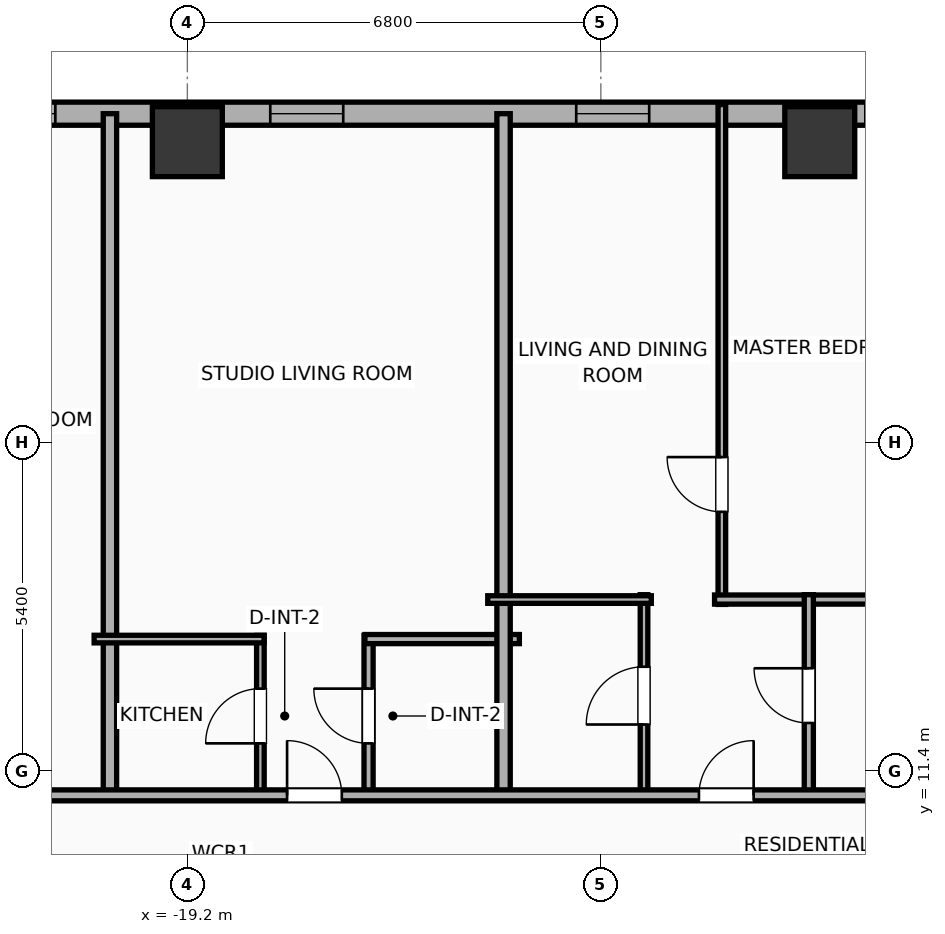
"""IFC4 building model, lengths in metres.
Left out: names, types, materials, properties, quantities, classifications, styles, units other than length and angle.
Written with IfcOpenShell. Run it as: python <this file> out.ifc"""

import sys

from ifc_helpers import new_model, si_unit, direction, frame, frame_2d, origin, origin_2d, place, context, subcontext, project, spatial, rectangle, hollow_rectangle, extrude, element, fill, save


model = new_model("IFC4")
c1 = context("Model", 3, precision=1e-05, world=origin(), true_north=direction((0.0, 1.0)))
c2 = subcontext(c1, "Body", "Model", "MODEL_VIEW")
j1 = project(units=[si_unit("LENGTHUNIT", "METRE"), si_unit("PLANEANGLEUNIT", "RADIAN")], contexts=[c1])
p1 = place(None, origin())
s1 = spatial("IfcSite", under=j1, at=p1, CompositionType="ELEMENT")
p2 = place(p1, origin())
s2 = spatial("IfcBuilding", under=s1, at=p2, CompositionType="ELEMENT")
p3 = place(p2, frame((0.0, 0.0, 65.0)))
s3 = spatial("IfcBuildingStorey", under=s2, at=p3, CompositionType="ELEMENT", Elevation=65.0)
for number, where, z_axis, x_axis in (
    (1, (-8.8, 21.75, 0.0), (0.0, 0.0, 1.0), (1.0, 0.0, 0.0)),
    (2, (-19.2, 21.75, 0.0), (0.0, 0.0, 1.0), (1.0, 0.0, 0.0)),
):
    element("IfcColumn", number, at=place(p3, frame(where, z_axis=z_axis, x_axis=x_axis)), inside=s3, PredefinedType="COLUMN", context=c2, shape_type="SweptSolid", body=[
        extrude(hollow_rectangle(XDim=1.15, YDim=1.15, WallThickness=0.04, at=origin_2d()), origin(), (0.0, 0.0, 1.0), 3.9),
    ])
p4 = place(p3, frame((-29.581, 22.21, 0.0), z_axis=(0.0, 0.0, 1.0), x_axis=(1.0, 0.0, 0.0)))
e3 = element("IfcWall", 3, at=p4, inside=s3, PredefinedType="ELEMENTEDWALL", context=c2, shape_type="SweptSolid", body=[
    extrude(rectangle(XDim=51.963, YDim=0.38, at=frame_2d((25.981, 0.0))), origin(), (0.0, 0.0, 1.0), 3.65),
])
p5 = place(p4, frame((5.81, 0.0, 0.75)))
e4 = element("IfcOpeningElement", 4, at=p5, cuts=e3, PredefinedType="OPENING", context=c2, shape_type="SweptSolid", body=[
    extrude(rectangle(XDim=2.4, YDim=2.1, at=frame_2d((1.2, 1.05))), frame((0.0, 0.2, 0.0), z_axis=(0.0, -1.0, 0.0), x_axis=(1.0, 0.0, 0.0)), (0.0, 0.0, 1.0), 0.4),
])
p6 = place(p4, frame((26.431, 0.0, 0.75)))
e5 = element("IfcOpeningElement", 5, at=p6, cuts=e3, PredefinedType="OPENING", context=c2, shape_type="SweptSolid", body=[
    extrude(rectangle(XDim=2.4, YDim=2.1, at=frame_2d((1.2, 1.05))), frame((0.0, 0.2, 0.0), z_axis=(0.0, -1.0, 0.0), x_axis=(1.0, 0.0, 0.0)), (0.0, 0.0, 1.0), 0.4),
])
p7 = place(p4, frame((43.752, 0.0, 0.75)))
e6 = element("IfcOpeningElement", 6, at=p7, cuts=e3, PredefinedType="OPENING", context=c2, shape_type="SweptSolid", body=[
    extrude(rectangle(XDim=2.4, YDim=2.1, at=frame_2d((1.2, 1.05))), frame((0.0, 0.2, 0.0), z_axis=(0.0, -1.0, 0.0), x_axis=(1.0, 0.0, 0.0)), (0.0, 0.0, 1.0), 0.4),
])
p8 = place(p4, frame((1.163, 0.0, 0.75)))
e7 = element("IfcOpeningElement", 7, at=p8, cuts=e3, PredefinedType="OPENING", context=c2, shape_type="SweptSolid", body=[
    extrude(rectangle(XDim=1.2, YDim=2.05, at=frame_2d((0.6, 1.025))), frame((0.0, 0.2, 0.0), z_axis=(0.0, -1.0, 0.0), x_axis=(1.0, 0.0, 0.0)), (0.0, 0.0, 1.0), 0.4),
])
p9 = place(p4, frame((3.251, 0.0, 0.75)))
e8 = element("IfcOpeningElement", 8, at=p9, cuts=e3, PredefinedType="OPENING", context=c2, shape_type="SweptSolid", body=[
    extrude(rectangle(XDim=1.2, YDim=2.05, at=frame_2d((0.6, 1.025))), frame((0.0, 0.2, 0.0), z_axis=(0.0, -1.0, 0.0), x_axis=(1.0, 0.0, 0.0)), (0.0, 0.0, 1.0), 0.4),
])
p10 = place(p4, frame((11.745, 0.0, 0.75)))
e9 = element("IfcOpeningElement", 9, at=p10, cuts=e3, PredefinedType="OPENING", context=c2, shape_type="SweptSolid", body=[
    extrude(rectangle(XDim=1.2, YDim=2.05, at=frame_2d((0.6, 1.025))), frame((0.0, 0.2, 0.0), z_axis=(0.0, -1.0, 0.0), x_axis=(1.0, 0.0, 0.0)), (0.0, 0.0, 1.0), 0.4),
])
p11 = place(p4, frame((16.776, 0.0, 0.75)))
e10 = element("IfcOpeningElement", 10, at=p11, cuts=e3, PredefinedType="OPENING", context=c2, shape_type="SweptSolid", body=[
    extrude(rectangle(XDim=1.2, YDim=2.05, at=frame_2d((0.6, 1.025))), frame((0.0, 0.2, 0.0), z_axis=(0.0, -1.0, 0.0), x_axis=(1.0, 0.0, 0.0)), (0.0, 0.0, 1.0), 0.4),
])
p12 = place(p4, frame((21.531, 0.0, 0.75)))
e11 = element("IfcOpeningElement", 11, at=p12, cuts=e3, PredefinedType="OPENING", context=c2, shape_type="SweptSolid", body=[
    extrude(rectangle(XDim=0.85, YDim=2.05, at=frame_2d((0.425, 1.025))), frame((0.0, 0.2, 0.0), z_axis=(0.0, -1.0, 0.0), x_axis=(1.0, 0.0, 0.0)), (0.0, 0.0, 1.0), 0.4),
])
p13 = place(p4, frame((23.776, 0.0, 0.75)))
e12 = element("IfcOpeningElement", 12, at=p13, cuts=e3, PredefinedType="OPENING", context=c2, shape_type="SweptSolid", body=[
    extrude(rectangle(XDim=1.2, YDim=2.05, at=frame_2d((0.6, 1.025))), frame((0.0, 0.2, 0.0), z_axis=(0.0, -1.0, 0.0), x_axis=(1.0, 0.0, 0.0)), (0.0, 0.0, 1.0), 0.4),
])
p14 = place(p4, frame((32.031, 0.0, 0.75)))
e13 = element("IfcOpeningElement", 13, at=p14, cuts=e3, PredefinedType="OPENING", context=c2, shape_type="SweptSolid", body=[
    extrude(rectangle(XDim=0.85, YDim=2.05, at=frame_2d((0.425, 1.025))), frame((0.0, 0.2, 0.0), z_axis=(0.0, -1.0, 0.0), x_axis=(1.0, 0.0, 0.0)), (0.0, 0.0, 1.0), 0.4),
])
p15 = place(p4, frame((34.276, 0.0, 0.75)))
e14 = element("IfcOpeningElement", 14, at=p15, cuts=e3, PredefinedType="OPENING", context=c2, shape_type="SweptSolid", body=[
    extrude(rectangle(XDim=1.2, YDim=2.05, at=frame_2d((0.6, 1.025))), frame((0.0, 0.2, 0.0), z_axis=(0.0, -1.0, 0.0), x_axis=(1.0, 0.0, 0.0)), (0.0, 0.0, 1.0), 0.4),
])
p16 = place(p4, frame((37.776, 0.0, 0.75)))
e15 = element("IfcOpeningElement", 15, at=p16, cuts=e3, PredefinedType="OPENING", context=c2, shape_type="SweptSolid", body=[
    extrude(rectangle(XDim=1.2, YDim=2.05, at=frame_2d((0.6, 1.025))), frame((0.0, 0.2, 0.0), z_axis=(0.0, -1.0, 0.0), x_axis=(1.0, 0.0, 0.0)), (0.0, 0.0, 1.0), 0.4),
])
p17 = place(p4, frame((42.411, 0.0, 0.75)))
e16 = element("IfcOpeningElement", 16, at=p17, cuts=e3, PredefinedType="OPENING", context=c2, shape_type="SweptSolid", body=[
    extrude(rectangle(XDim=0.85, YDim=2.05, at=frame_2d((0.425, 1.025))), frame((0.0, 0.2, 0.0), z_axis=(0.0, -1.0, 0.0), x_axis=(1.0, 0.0, 0.0)), (0.0, 0.0, 1.0), 0.4),
])
p18 = place(p4, frame((47.791, 0.0, 0.75)))
e17 = element("IfcOpeningElement", 17, at=p18, cuts=e3, PredefinedType="OPENING", context=c2, shape_type="SweptSolid", body=[
    extrude(rectangle(XDim=1.2, YDim=2.05, at=frame_2d((0.6, 1.025))), frame((0.0, 0.2, 0.0), z_axis=(0.0, -1.0, 0.0), x_axis=(1.0, 0.0, 0.0)), (0.0, 0.0, 1.0), 0.4),
])
p19 = place(p4, frame((49.901, 0.0, 0.75)))
e18 = element("IfcOpeningElement", 18, at=p19, cuts=e3, PredefinedType="OPENING", context=c2, shape_type="SweptSolid", body=[
    extrude(rectangle(XDim=1.2, YDim=2.05, at=frame_2d((0.6, 1.025))), frame((0.0, 0.2, 0.0), z_axis=(0.0, -1.0, 0.0), x_axis=(1.0, 0.0, 0.0)), (0.0, 0.0, 1.0), 0.4),
])
p20 = place(p3, frame((-20.473, 10.92, 0.0), z_axis=(0.0, 0.0, 1.0), x_axis=(0.0, 1.0, 0.0)))
e19 = element("IfcWall", 19, at=p20, inside=s3, PredefinedType="PARTITIONING", context=c2, shape_type="SweptSolid", body=[
    extrude(rectangle(XDim=11.29, YDim=0.22, at=frame_2d((5.645, 0.0))), origin(), (0.0, 0.0, 1.0), 3.65),
])
p21 = place(p3, frame((-17.999, 10.98, 0.0), z_axis=(0.0, 0.0, 1.0), x_axis=(0.0, 1.0, 0.0)))
e20 = element("IfcWall", 20, at=p21, inside=s3, PredefinedType="PARTITIONING", context=c2, shape_type="SweptSolid", body=[
    extrude(rectangle(XDim=2.65, YDim=0.125, at=frame_2d((1.325, 0.0))), origin(), (0.0, 0.0, 1.0), 3.65),
])
p22 = place(p21, frame((0.875, 0.0, 0.0)))
e21 = element("IfcOpeningElement", 21, at=p22, cuts=e20, PredefinedType="OPENING", context=c2, shape_type="SweptSolid", body=[
    extrude(rectangle(XDim=0.9, YDim=2.05, at=frame_2d((0.45, 1.025))), frame((0.0, 0.073, 0.0), z_axis=(0.0, -1.0, 0.0), x_axis=(1.0, 0.0, 0.0)), (0.0, 0.0, 1.0), 0.145),
])
p23 = place(p3, frame((-16.22, 10.98, 0.0), z_axis=(0.0, 0.0, 1.0), x_axis=(0.0, 1.0, 0.0)))
e22 = element("IfcWall", 22, at=p23, inside=s3, PredefinedType="PLUMBINGWALL", context=c2, shape_type="SweptSolid", body=[
    extrude(rectangle(XDim=2.65, YDim=0.15, at=frame_2d((1.325, 0.0))), origin(), (0.0, 0.0, 1.0), 3.65),
])
p24 = place(p23, frame((0.875, 0.0, 0.0)))
e23 = element("IfcOpeningElement", 23, at=p24, cuts=e22, PredefinedType="OPENING", context=c2, shape_type="SweptSolid", body=[
    extrude(rectangle(XDim=0.9, YDim=2.05, at=frame_2d((0.45, 1.025))), frame((0.0, 0.085, 0.0), z_axis=(0.0, -1.0, 0.0), x_axis=(1.0, 0.0, 0.0)), (0.0, 0.0, 1.0), 0.17),
])
p25 = place(p3, frame((-20.733, 13.57, 0.0), z_axis=(0.0, 0.0, 1.0), x_axis=(1.0, 0.0, 0.0)))
e24 = element("IfcWall", 24, at=p25, inside=s3, PredefinedType="PARTITIONING", context=c2, shape_type="SweptSolid", body=[
    extrude(rectangle(XDim=2.794, YDim=0.125, at=frame_2d((1.397, 0.0))), origin(), (0.0, 0.0, 1.0), 3.65),
])
p26 = place(p3, frame((-16.28, 13.57, 0.0), z_axis=(0.0, 0.0, 1.0), x_axis=(1.0, 0.0, 0.0)))
e25 = element("IfcWall", 25, at=p26, inside=s3, PredefinedType="PLUMBINGWALL", context=c2, shape_type="SweptSolid", body=[
    extrude(rectangle(XDim=2.54, YDim=0.15, at=frame_2d((1.27, 0.0))), origin(), (0.0, 0.0, 1.0), 3.65),
])
p27 = place(p3, frame((-14.0, 10.92, 0.0), z_axis=(0.0, 0.0, 1.0), x_axis=(0.0, 1.0, 0.0)))
e26 = element("IfcWall", 26, at=p27, inside=s3, PredefinedType="PARTITIONING", context=c2, shape_type="SweptSolid", body=[
    extrude(rectangle(XDim=11.29, YDim=0.22, at=frame_2d((5.645, 0.0))), origin(), (0.0, 0.0, 1.0), 3.65),
])
p28 = place(p3, frame((-10.41, 14.14, 0.0), z_axis=(0.0, 0.0, 1.0), x_axis=(0.0, 1.0, 0.0)))
e27 = element("IfcWall", 27, at=p28, inside=s3, PredefinedType="PARTITIONING", context=c2, shape_type="SweptSolid", body=[
    extrude(rectangle(XDim=8.22, YDim=0.125, at=frame_2d((4.11, 0.0))), origin(), (0.0, 0.0, 1.0), 2.94),
])
p29 = place(p28, frame((1.523, 0.0, 0.0)))
e28 = element("IfcOpeningElement", 28, at=p29, cuts=e27, PredefinedType="OPENING", context=c2, shape_type="SweptSolid", body=[
    extrude(rectangle(XDim=0.9, YDim=2.05, at=frame_2d((0.45, 1.025))), frame((0.0, 0.073, 0.0), z_axis=(0.0, -1.0, 0.0), x_axis=(1.0, 0.0, 0.0)), (0.0, 0.0, 1.0), 0.145),
])
p30 = place(p3, frame((-10.53, 14.22, 0.0), z_axis=(0.0, 0.0, 1.0), x_axis=(1.0, 0.0, 0.0)))
e29 = element("IfcWall", 29, at=p30, inside=s3, PredefinedType="PLUMBINGWALL", context=c2, shape_type="SweptSolid", body=[
    extrude(rectangle(XDim=3.605, YDim=0.15, at=frame_2d((1.802, 0.0))), origin(), (0.0, 0.0, 1.0), 3.65),
])
p31 = place(p3, frame((-11.69, 10.98, 0.0), z_axis=(0.0, 0.0, 1.0), x_axis=(0.0, 1.0, 0.0)))
e30 = element("IfcWall", 30, at=p31, inside=s3, PredefinedType="PARTITIONING", context=c2, shape_type="SweptSolid", body=[
    extrude(rectangle(XDim=3.32, YDim=0.125, at=frame_2d((1.66, 0.0))), origin(), (0.0, 0.0, 1.0), 3.65),
])
p32 = place(p31, frame((1.185, 0.0, 0.0)))
e31 = element("IfcOpeningElement", 31, at=p32, cuts=e30, PredefinedType="OPENING", context=c2, shape_type="SweptSolid", body=[
    extrude(rectangle(XDim=0.95, YDim=2.05, at=frame_2d((0.475, 1.025))), frame((0.0, 0.073, 0.0), z_axis=(0.0, -1.0, 0.0), x_axis=(1.0, 0.0, 0.0)), (0.0, 0.0, 1.0), 0.145),
])
p33 = place(p3, frame((-14.26, 14.22, 0.0), z_axis=(0.0, 0.0, 1.0), x_axis=(1.0, 0.0, 0.0)))
e32 = element("IfcWall", 32, at=p33, inside=s3, PredefinedType="PARTITIONING", context=c2, shape_type="SweptSolid", body=[
    extrude(rectangle(XDim=2.69, YDim=0.125, at=frame_2d((1.345, 0.0))), origin(), (0.0, 0.0, 1.0), 3.65),
])
p34 = place(p3, frame((-8.98, 10.98, 0.0), z_axis=(0.0, 0.0, 1.0), x_axis=(0.0, 1.0, 0.0)))
e33 = element("IfcWall", 33, at=p34, inside=s3, PredefinedType="PLUMBINGWALL", context=c2, shape_type="SweptSolid", body=[
    extrude(rectangle(XDim=3.32, YDim=0.15, at=frame_2d((1.66, 0.0))), origin(), (0.0, 0.0, 1.0), 3.65),
])
p35 = place(p34, frame((1.21, 0.0, 0.0)))
e34 = element("IfcOpeningElement", 34, at=p35, cuts=e33, PredefinedType="OPENING", context=c2, shape_type="SweptSolid", body=[
    extrude(rectangle(XDim=0.9, YDim=2.05, at=frame_2d((0.45, 1.025))), frame((0.0, 0.085, 0.0), z_axis=(0.0, -1.0, 0.0), x_axis=(1.0, 0.0, 0.0)), (0.0, 0.0, 1.0), 0.17),
])
p36 = place(p3, frame((-33.41, 11.0, 0.0), z_axis=(0.0, 0.0, 1.0), x_axis=(1.0, 0.0, 0.0)))
e35 = element("IfcWall", 35, at=p36, inside=s3, PredefinedType="PARTITIONING", context=c2, shape_type="SweptSolid", body=[
    extrude(rectangle(XDim=59.62, YDim=0.18, at=frame_2d((29.81, 0.0))), origin(), (0.0, 0.0, 1.0), 3.65),
])
p37 = place(p36, frame((2.913, 0.0, 0.0)))
e36 = element("IfcOpeningElement", 36, at=p37, cuts=e35, PredefinedType="OPENING", context=c2, shape_type="SweptSolid", body=[
    extrude(rectangle(XDim=0.9, YDim=2.05, at=frame_2d((0.45, 1.025))), frame((0.0, 0.1, 0.0), z_axis=(0.0, -1.0, 0.0), x_axis=(1.0, 0.0, 0.0)), (0.0, 0.0, 1.0), 0.2),
])
p38 = place(p36, frame((10.312, 0.0, 0.0)))
e37 = element("IfcOpeningElement", 37, at=p38, cuts=e35, PredefinedType="OPENING", context=c2, shape_type="SweptSolid", body=[
    extrude(rectangle(XDim=1.15, YDim=2.05, at=frame_2d((0.575, 1.025))), frame((0.0, 0.1, 0.0), z_axis=(0.0, -1.0, 0.0), x_axis=(1.0, 0.0, 0.0)), (0.0, 0.0, 1.0), 0.2),
])
p39 = place(p36, frame((15.85, 0.0, 0.0)))
e38 = element("IfcOpeningElement", 38, at=p39, cuts=e35, PredefinedType="OPENING", context=c2, shape_type="SweptSolid", body=[
    extrude(rectangle(XDim=0.9, YDim=2.05, at=frame_2d((0.45, 1.025))), frame((0.0, 0.1, 0.0), z_axis=(0.0, -1.0, 0.0), x_axis=(1.0, 0.0, 0.0)), (0.0, 0.0, 1.0), 0.2),
])
p40 = place(p36, frame((22.623, 0.0, 0.0)))
e39 = element("IfcOpeningElement", 39, at=p40, cuts=e35, PredefinedType="OPENING", context=c2, shape_type="SweptSolid", body=[
    extrude(rectangle(XDim=0.9, YDim=2.05, at=frame_2d((0.45, 1.025))), frame((0.0, 0.1, 0.0), z_axis=(0.0, -1.0, 0.0), x_axis=(1.0, 0.0, 0.0)), (0.0, 0.0, 1.0), 0.2),
])
p41 = place(p36, frame((29.622, 0.0, 0.0)))
e40 = element("IfcOpeningElement", 40, at=p41, cuts=e35, PredefinedType="OPENING", context=c2, shape_type="SweptSolid", body=[
    extrude(rectangle(XDim=0.9, YDim=2.05, at=frame_2d((0.45, 1.025))), frame((0.0, 0.1, 0.0), z_axis=(0.0, -1.0, 0.0), x_axis=(1.0, 0.0, 0.0)), (0.0, 0.0, 1.0), 0.2),
])
p42 = place(p36, frame((36.628, 0.0, 0.0)))
e41 = element("IfcOpeningElement", 41, at=p42, cuts=e35, PredefinedType="OPENING", context=c2, shape_type="SweptSolid", body=[
    extrude(rectangle(XDim=0.9, YDim=2.05, at=frame_2d((0.45, 1.025))), frame((0.0, 0.1, 0.0), z_axis=(0.0, -1.0, 0.0), x_axis=(1.0, 0.0, 0.0)), (0.0, 0.0, 1.0), 0.2),
])
p43 = place(p36, frame((43.627, 0.0, 0.0)))
e42 = element("IfcOpeningElement", 42, at=p43, cuts=e35, PredefinedType="OPENING", context=c2, shape_type="SweptSolid", body=[
    extrude(rectangle(XDim=0.9, YDim=2.05, at=frame_2d((0.45, 1.025))), frame((0.0, 0.1, 0.0), z_axis=(0.0, -1.0, 0.0), x_axis=(1.0, 0.0, 0.0)), (0.0, 0.0, 1.0), 0.2),
])
p44 = place(p36, frame((48.617, 0.0, 0.0)))
e43 = element("IfcOpeningElement", 43, at=p44, cuts=e35, PredefinedType="OPENING", context=c2, shape_type="SweptSolid", body=[
    extrude(rectangle(XDim=1.15, YDim=2.05, at=frame_2d((0.575, 1.025))), frame((0.0, 0.1, 0.0), z_axis=(0.0, -1.0, 0.0), x_axis=(1.0, 0.0, 0.0)), (0.0, 0.0, 1.0), 0.2),
])
p45 = place(p36, frame((56.272, 0.0, 0.0)))
e44 = element("IfcOpeningElement", 44, at=p45, cuts=e35, PredefinedType="OPENING", context=c2, shape_type="SweptSolid", body=[
    extrude(rectangle(XDim=0.9, YDim=2.05, at=frame_2d((0.45, 1.025))), frame((0.0, 0.1, 0.0), z_axis=(0.0, -1.0, 0.0), x_axis=(1.0, 0.0, 0.0)), (0.0, 0.0, 1.0), 0.2),
])
p46 = place(p5, origin())
e45 = element("IfcWindow", 45, at=p46, inside=s3, PartitioningType="SINGLE_PANEL", PredefinedType="WINDOW", context=c2, shape_type="SweptSolid", body=[
    extrude(rectangle(XDim=2.4, YDim=2.1, at=frame_2d((1.2, 1.05))), frame((0.0, 0.03, 0.0), z_axis=(0.0, -1.0, 0.0), x_axis=(1.0, 0.0, 0.0)), (0.0, 0.0, 1.0), 0.06),
])
fill(e4, e45)
p47 = place(p10, origin())
e46 = element("IfcWindow", 46, at=p47, inside=s3, PartitioningType="SINGLE_PANEL", PredefinedType="WINDOW", context=c2, shape_type="SweptSolid", body=[
    extrude(rectangle(XDim=1.2, YDim=2.05, at=frame_2d((0.6, 1.025))), frame((0.0, 0.03, 0.0), z_axis=(0.0, -1.0, 0.0), x_axis=(1.0, 0.0, 0.0)), (0.0, 0.0, 1.0), 0.06),
])
fill(e9, e46)
p48 = place(p11, origin())
e47 = element("IfcWindow", 47, at=p48, inside=s3, PartitioningType="SINGLE_PANEL", PredefinedType="WINDOW", context=c2, shape_type="SweptSolid", body=[
    extrude(rectangle(XDim=1.2, YDim=2.05, at=frame_2d((0.6, 1.025))), frame((0.0, 0.03, 0.0), z_axis=(0.0, -1.0, 0.0), x_axis=(1.0, 0.0, 0.0)), (0.0, 0.0, 1.0), 0.06),
])
fill(e10, e47)
p49 = place(p12, origin())
e48 = element("IfcWindow", 48, at=p49, inside=s3, PartitioningType="SINGLE_PANEL", PredefinedType="WINDOW", context=c2, shape_type="SweptSolid", body=[
    extrude(rectangle(XDim=0.85, YDim=2.05, at=frame_2d((0.425, 1.025))), frame((0.0, 0.03, 0.0), z_axis=(0.0, -1.0, 0.0), x_axis=(1.0, 0.0, 0.0)), (0.0, 0.0, 1.0), 0.06),
])
fill(e11, e48)
p50 = place(p22, origin())
e49 = element("IfcDoor", 49, at=p50, inside=s3, OperationType="SINGLE_SWING_LEFT", PredefinedType="DOOR", context=c2, shape_type="SweptSolid", body=[
    extrude(rectangle(XDim=0.9, YDim=2.05, at=frame_2d((0.45, 1.025))), frame((0.0, 0.025, 0.0), z_axis=(0.0, -1.0, 0.0), x_axis=(1.0, 0.0, 0.0)), (0.0, 0.0, 1.0), 0.05),
])
fill(e21, e49)
p51 = place(p24, origin())
e50 = element("IfcDoor", 50, at=p51, inside=s3, OperationType="SINGLE_SWING_RIGHT", PredefinedType="DOOR", context=c2, shape_type="SweptSolid", body=[
    extrude(rectangle(XDim=0.9, YDim=2.05, at=frame_2d((0.45, 1.025))), frame((0.0, 0.025, 0.0), z_axis=(0.0, -1.0, 0.0), x_axis=(1.0, 0.0, 0.0)), (0.0, 0.0, 1.0), 0.05),
])
fill(e23, e50)
p52 = place(p29, origin())
e51 = element("IfcDoor", 51, at=p52, inside=s3, OperationType="SINGLE_SWING_RIGHT", PredefinedType="DOOR", context=c2, shape_type="SweptSolid", body=[
    extrude(rectangle(XDim=0.9, YDim=2.05, at=frame_2d((0.45, 1.025))), frame((0.0, 0.025, 0.0), z_axis=(0.0, -1.0, 0.0), x_axis=(1.0, 0.0, 0.0)), (0.0, 0.0, 1.0), 0.05),
])
fill(e28, e51)
p53 = place(p32, origin())
e52 = element("IfcDoor", 52, at=p53, inside=s3, OperationType="SINGLE_SWING_LEFT", PredefinedType="DOOR", context=c2, shape_type="SweptSolid", body=[
    extrude(rectangle(XDim=0.95, YDim=2.05, at=frame_2d((0.475, 1.025))), frame((0.0, 0.025, 0.0), z_axis=(0.0, -1.0, 0.0), x_axis=(1.0, 0.0, 0.0)), (0.0, 0.0, 1.0), 0.05),
])
fill(e31, e52)
p54 = place(p35, origin())
e53 = element("IfcDoor", 53, at=p54, inside=s3, OperationType="SINGLE_SWING_RIGHT", PredefinedType="DOOR", context=c2, shape_type="SweptSolid", body=[
    extrude(rectangle(XDim=0.9, YDim=2.05, at=frame_2d((0.45, 1.025))), frame((0.0, 0.025, 0.0), z_axis=(0.0, -1.0, 0.0), x_axis=(1.0, 0.0, 0.0)), (0.0, 0.0, 1.0), 0.05),
])
fill(e34, e53)
p55 = place(p39, origin())
e54 = element("IfcDoor", 54, at=p55, inside=s3, OperationType="SINGLE_SWING_LEFT", PredefinedType="DOOR", context=c2, shape_type="SweptSolid", body=[
    extrude(rectangle(XDim=0.9, YDim=2.05, at=frame_2d((0.45, 1.025))), frame((0.0, 0.025, 0.0), z_axis=(0.0, -1.0, 0.0), x_axis=(1.0, 0.0, 0.0)), (0.0, 0.0, 1.0), 0.05),
])
fill(e38, e54)
p56 = place(p40, origin())
e55 = element("IfcDoor", 55, at=p56, inside=s3, OperationType="SINGLE_SWING_RIGHT", PredefinedType="DOOR", context=c2, shape_type="SweptSolid", body=[
    extrude(rectangle(XDim=0.9, YDim=2.05, at=frame_2d((0.45, 1.025))), frame((0.0, 0.025, 0.0), z_axis=(0.0, -1.0, 0.0), x_axis=(1.0, 0.0, 0.0)), (0.0, 0.0, 1.0), 0.05),
])
fill(e39, e55)
save(model, sys.argv[1])
